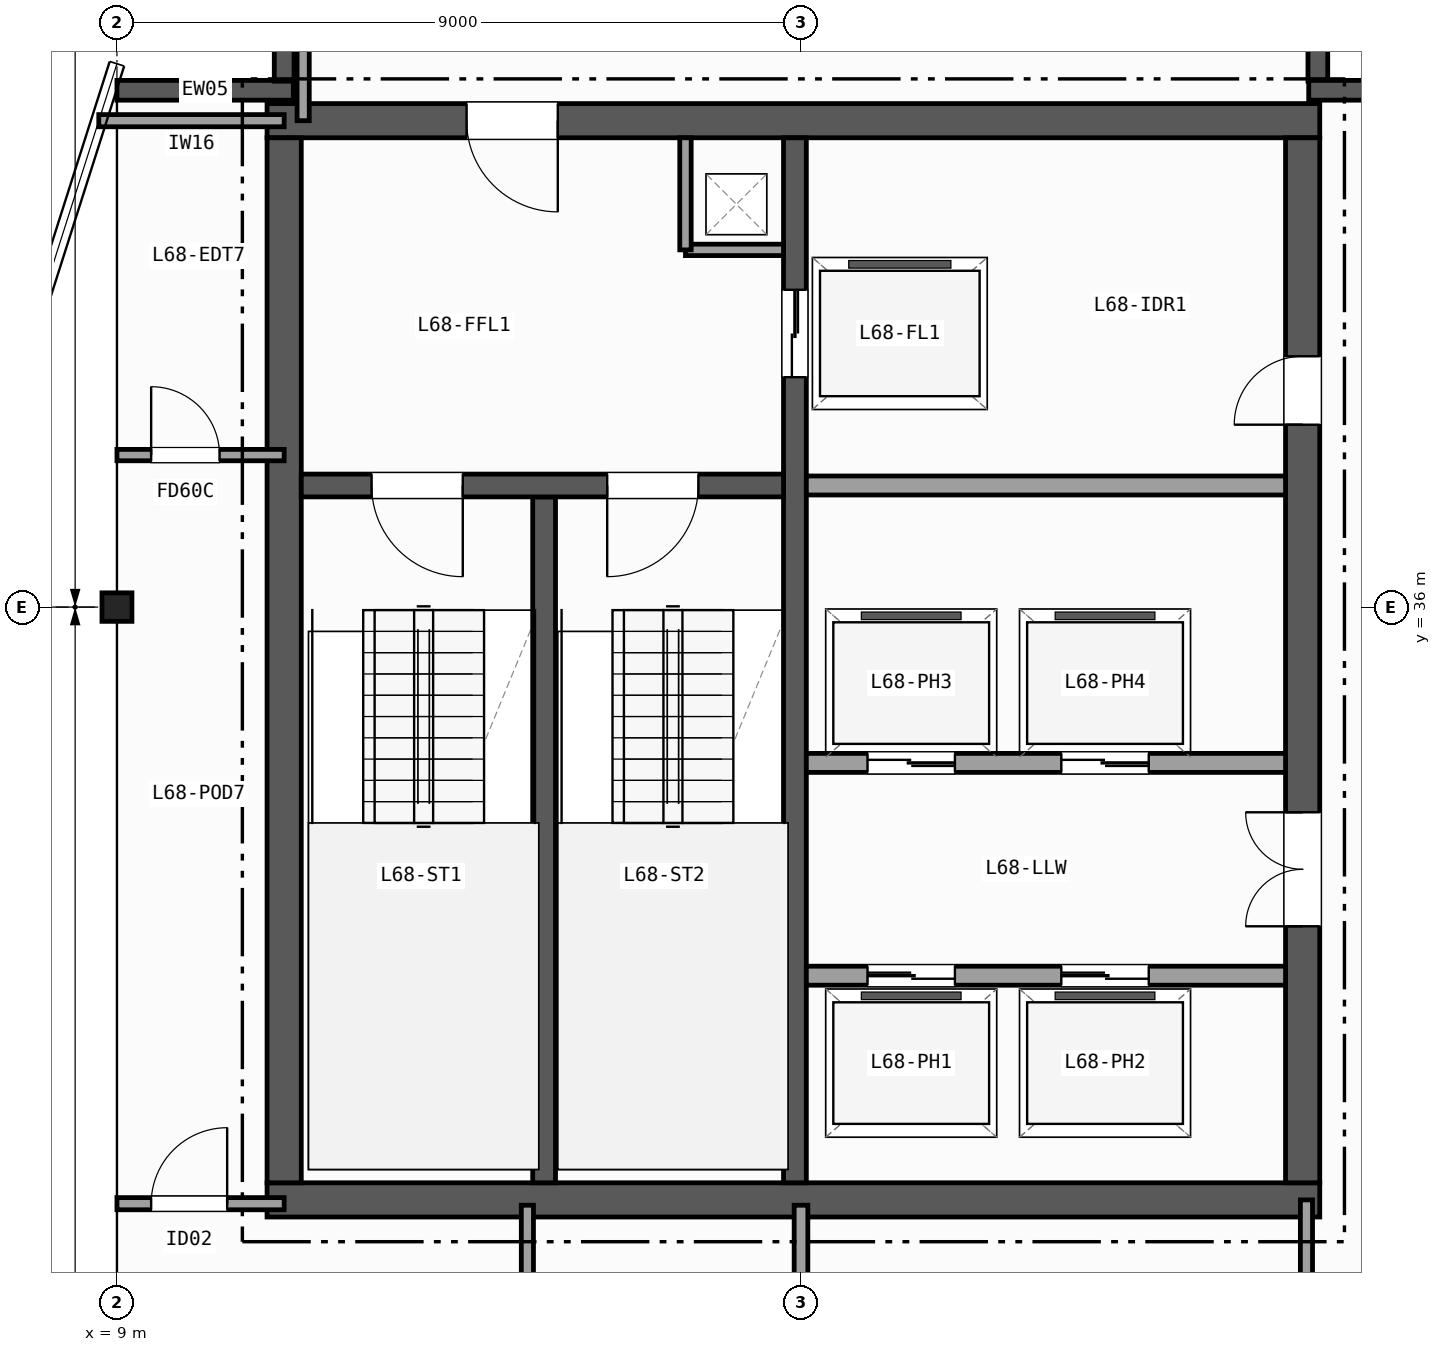
"""IFC4 building model, lengths in metres.
Left out: names, types, materials, properties, quantities, classifications, styles, units other than length and angle.
Written with IfcOpenShell. Run it as: python <this file> out.ifc"""

import sys

from ifc_helpers import new_model, si_unit, direction, frame, frame_2d, origin, origin_2d, place, context, subcontext, project, spatial, rectangle, i_section, extrude, element, fill, save


model = new_model("IFC4")
c1 = context("Model", 3, precision=1e-05, world=origin(), true_north=direction((0.0, 1.0)))
c2 = subcontext(c1, "Body", "Model", "MODEL_VIEW")
j1 = project(units=[si_unit("LENGTHUNIT", "METRE"), si_unit("PLANEANGLEUNIT", "RADIAN")], contexts=[c1])
p1 = place(None, origin())
s1 = spatial("IfcSite", under=j1, at=p1, CompositionType="ELEMENT")
p2 = place(p1, origin())
s2 = spatial("IfcBuilding", under=s1, at=p2, CompositionType="ELEMENT")
p3 = place(p2, frame((0.0, 0.0, 270.4)))
s3 = spatial("IfcBuildingStorey", under=s2, at=p3, CompositionType="ELEMENT", Elevation=270.4)
p4 = place(p3, frame((9.0, 36.0, 0.0), z_axis=(0.0, 0.0, 1.0), x_axis=(1.0, 0.0, 0.0)))
e1 = element("IfcColumn", 1, at=p4, inside=s3, PredefinedType="COLUMN", context=c2, shape_type="SweptSolid", body=[
    extrude(i_section(OverallWidth=0.394, OverallDepth=0.375, WebThickness=0.017, FlangeThickness=0.028, FilletRadius=0.015, at=origin_2d()), origin(), (0.0, 0.0, 1.0), 3.7),
])
p5 = place(p3, frame((9.0, 42.8, 0.0), z_axis=(0.0, 0.0, 1.0), x_axis=(1.0, 0.0, 0.0)))
e2 = element("IfcWall", 2, at=p5, inside=s3, PredefinedType="SOLIDWALL", context=c2, shape_type="SweptSolid", body=[
    extrude(rectangle(XDim=2.32, YDim=0.26, at=frame_2d((1.16, 0.0))), origin(), (0.0, 0.0, 1.0), 3.42),
])
for number, where, z_axis, x_axis in (
    (3, (11.2, 42.92, 0.0), (0.0, 0.0, 1.0), (0.0, 1.0, 0.0)),
    (4, (24.8, 45.0, 0.0), (0.0, 0.0, 1.0), (0.0, -1.0, 0.0)),
):
    element("IfcWall", number, at=place(p3, frame(where, z_axis=z_axis, x_axis=x_axis)), inside=s3, PredefinedType="SOLIDWALL", context=c2, shape_type="SweptSolid", body=[
        extrude(rectangle(XDim=2.08, YDim=0.26, at=frame_2d((1.04, 0.0))), origin(), (0.0, 0.0, 1.0), 3.42),
    ])
p6 = place(p3, frame((24.68, 42.8, 0.0), z_axis=(0.0, 0.0, 1.0), x_axis=(1.0, 0.0, 0.0)))
e5 = element("IfcWall", 5, at=p6, inside=s3, PredefinedType="SOLIDWALL", context=c2, shape_type="SweptSolid", body=[
    extrude(rectangle(XDim=2.32, YDim=0.26, at=frame_2d((1.16, 0.0))), origin(), (0.0, 0.0, 1.0), 3.42),
])
p7 = place(p3, frame((10.975, 28.2, 0.0), z_axis=(0.0, 0.0, 1.0), x_axis=(1.0, 0.0, 0.0)))
e6 = element("IfcWall", 6, at=p7, inside=s3, PredefinedType="SHEAR", context=c2, shape_type="SweptSolid", body=[
    extrude(rectangle(XDim=13.85, YDim=0.45, at=frame_2d((6.925, 0.0))), origin(), (0.0, 0.0, 1.0), 3.42),
])
p8 = place(p3, frame((24.825, 42.4, 0.0), z_axis=(0.0, 0.0, 1.0), x_axis=(-1.0, 0.0, 0.0)))
e7 = element("IfcWall", 7, at=p8, inside=s3, PredefinedType="SHEAR", context=c2, shape_type="SweptSolid", body=[
    extrude(rectangle(XDim=13.85, YDim=0.45, at=frame_2d((6.925, 0.0))), origin(), (0.0, 0.0, 1.0), 3.42),
])
p9 = place(p8, frame((10.025, 0.0, 0.0)))
e8 = element("IfcOpeningElement", 8, at=p9, cuts=e7, PredefinedType="OPENING", context=c2, shape_type="SweptSolid", body=[
    extrude(rectangle(XDim=1.2, YDim=2.15, at=frame_2d((0.6, 1.075))), frame((0.0, 0.235, 0.0), z_axis=(0.0, -1.0, 0.0), x_axis=(1.0, 0.0, 0.0)), (0.0, 0.0, 1.0), 0.47),
])
p10 = place(p3, frame((11.2, 42.175, 0.0), z_axis=(0.0, 0.0, 1.0), x_axis=(0.0, -1.0, 0.0)))
e9 = element("IfcWall", 9, at=p10, inside=s3, PredefinedType="SHEAR", context=c2, shape_type="SweptSolid", body=[
    extrude(rectangle(XDim=13.75, YDim=0.45, at=frame_2d((6.875, 0.0))), origin(), (0.0, 0.0, 1.0), 3.42),
])
p11 = place(p3, frame((24.6, 28.425, 0.0), z_axis=(0.0, 0.0, 1.0), x_axis=(0.0, 1.0, 0.0)))
e10 = element("IfcWall", 10, at=p11, inside=s3, PredefinedType="SHEAR", context=c2, shape_type="SweptSolid", body=[
    extrude(rectangle(XDim=13.75, YDim=0.45, at=frame_2d((6.875, 0.0))), origin(), (0.0, 0.0, 1.0), 3.42),
])
p12 = place(p11, frame((3.375, 0.0, 0.0)))
e11 = element("IfcOpeningElement", 11, at=p12, cuts=e10, PredefinedType="OPENING", context=c2, shape_type="SweptSolid", body=[
    extrude(rectangle(XDim=1.5, YDim=2.2, at=frame_2d((0.75, 1.1))), frame((0.0, 0.235, 0.0), z_axis=(0.0, -1.0, 0.0), x_axis=(1.0, 0.0, 0.0)), (0.0, 0.0, 1.0), 0.47),
])
p13 = place(p11, frame((9.975, 0.0, 0.0)))
e12 = element("IfcOpeningElement", 12, at=p13, cuts=e10, PredefinedType="OPENING", context=c2, shape_type="SweptSolid", body=[
    extrude(rectangle(XDim=0.9, YDim=2.1, at=frame_2d((0.45, 1.05))), frame((0.0, 0.235, 0.0), z_axis=(0.0, -1.0, 0.0), x_axis=(1.0, 0.0, 0.0)), (0.0, 0.0, 1.0), 0.47),
])
p14 = place(p3, frame((14.62, 28.425, 0.0), z_axis=(0.0, 0.0, 1.0), x_axis=(0.0, 1.0, 0.0)))
e13 = element("IfcWall", 13, at=p14, inside=s3, PredefinedType="SHEAR", context=c2, shape_type="SweptSolid", body=[
    extrude(rectangle(XDim=9.025, YDim=0.3, at=frame_2d((4.512, 0.0))), origin(), (0.0, 0.0, 1.0), 3.42),
])
p15 = place(p3, frame((17.92, 42.175, 0.0), z_axis=(0.0, 0.0, 1.0), x_axis=(0.0, -1.0, 0.0)))
e14 = element("IfcWall", 14, at=p15, inside=s3, PredefinedType="SHEAR", context=c2, shape_type="SweptSolid", body=[
    extrude(rectangle(XDim=13.75, YDim=0.3, at=frame_2d((6.875, 0.0))), origin(), (0.0, 0.0, 1.0), 3.42),
])
p16 = place(p15, frame((2.0, 0.0, 0.0)))
e15 = element("IfcOpeningElement", 15, at=p16, cuts=e14, PredefinedType="OPENING", context=c2, shape_type="SweptSolid", body=[
    extrude(rectangle(XDim=1.15, YDim=2.15, at=frame_2d((0.575, 1.075))), frame((0.0, 0.16, 0.0), z_axis=(0.0, -1.0, 0.0), x_axis=(1.0, 0.0, 0.0)), (0.0, 0.0, 1.0), 0.32),
])
p17 = place(p3, frame((17.77, 37.6, 0.0), z_axis=(0.0, 0.0, 1.0), x_axis=(-1.0, 0.0, 0.0)))
e16 = element("IfcWall", 16, at=p17, inside=s3, PredefinedType="SHEAR", context=c2, shape_type="SweptSolid", body=[
    extrude(rectangle(XDim=6.345, YDim=0.3, at=frame_2d((3.172, 0.0))), origin(), (0.0, 0.0, 1.0), 3.42),
])
p18 = place(p17, frame((4.22, 0.0, 0.0)))
e17 = element("IfcOpeningElement", 17, at=p18, cuts=e16, PredefinedType="OPENING", context=c2, shape_type="SweptSolid", body=[
    extrude(rectangle(XDim=1.2, YDim=2.15, at=frame_2d((0.6, 1.075))), frame((0.0, 0.16, 0.0), z_axis=(0.0, -1.0, 0.0), x_axis=(1.0, 0.0, 0.0)), (0.0, 0.0, 1.0), 0.32),
])
p19 = place(p17, frame((1.12, 0.0, 0.0)))
e18 = element("IfcOpeningElement", 18, at=p19, cuts=e16, PredefinedType="OPENING", context=c2, shape_type="SweptSolid", body=[
    extrude(rectangle(XDim=1.2, YDim=2.15, at=frame_2d((0.6, 1.075))), frame((0.0, 0.16, 0.0), z_axis=(0.0, -1.0, 0.0), x_axis=(1.0, 0.0, 0.0)), (0.0, 0.0, 1.0), 0.32),
])
p20 = place(p3, frame((16.48, 40.7, 0.0), z_axis=(0.0, 0.0, 1.0), x_axis=(1.0, 0.0, 0.0)))
e19 = element("IfcWall", 19, at=p20, inside=s3, PredefinedType="PARTITIONING", context=c2, shape_type="SweptSolid", body=[
    extrude(rectangle(XDim=1.29, YDim=0.15, at=frame_2d((0.645, 0.0))), origin(), (0.0, 0.0, 1.0), 3.42),
])
p21 = place(p3, frame((16.48, 40.7, 0.0), z_axis=(0.0, 0.0, 1.0), x_axis=(0.0, 1.0, 0.0)))
e20 = element("IfcWall", 20, at=p21, inside=s3, PredefinedType="PARTITIONING", context=c2, shape_type="SweptSolid", body=[
    extrude(rectangle(XDim=1.475, YDim=0.15, at=frame_2d((0.738, 0.0))), origin(), (0.0, 0.0, 1.0), 3.42),
])
p22 = place(p3, frame((18.07, 37.6, 0.0), z_axis=(0.0, 0.0, 1.0), x_axis=(1.0, 0.0, 0.0)))
e21 = element("IfcWall", 21, at=p22, inside=s3, PredefinedType="PARTITIONING", context=c2, shape_type="SweptSolid", body=[
    extrude(rectangle(XDim=6.305, YDim=0.25, at=frame_2d((3.152, 0.0))), origin(), (0.0, 0.0, 1.0), 3.42),
])
p23 = place(p3, frame((18.07, 31.15, 0.0), z_axis=(0.0, 0.0, 1.0), x_axis=(1.0, 0.0, 0.0)))
e22 = element("IfcWall", 22, at=p23, inside=s3, PredefinedType="PARTITIONING", context=c2, shape_type="SweptSolid", body=[
    extrude(rectangle(XDim=6.305, YDim=0.25, at=frame_2d((3.152, 0.0))), origin(), (0.0, 0.0, 1.0), 3.42),
])
p24 = place(p23, frame((0.805, 0.0, 0.0)))
e23 = element("IfcOpeningElement", 23, at=p24, cuts=e22, PredefinedType="OPENING", context=c2, shape_type="SweptSolid", body=[
    extrude(rectangle(XDim=1.15, YDim=2.15, at=frame_2d((0.575, 1.075))), frame((0.0, 0.135, 0.0), z_axis=(0.0, -1.0, 0.0), x_axis=(1.0, 0.0, 0.0)), (0.0, 0.0, 1.0), 0.27),
])
p25 = place(p23, frame((3.355, 0.0, 0.0)))
e24 = element("IfcOpeningElement", 24, at=p25, cuts=e22, PredefinedType="OPENING", context=c2, shape_type="SweptSolid", body=[
    extrude(rectangle(XDim=1.15, YDim=2.15, at=frame_2d((0.575, 1.075))), frame((0.0, 0.135, 0.0), z_axis=(0.0, -1.0, 0.0), x_axis=(1.0, 0.0, 0.0)), (0.0, 0.0, 1.0), 0.27),
])
p26 = place(p3, frame((24.375, 33.95, 0.0), z_axis=(0.0, 0.0, 1.0), x_axis=(-1.0, 0.0, 0.0)))
e25 = element("IfcWall", 25, at=p26, inside=s3, PredefinedType="PARTITIONING", context=c2, shape_type="SweptSolid", body=[
    extrude(rectangle(XDim=6.305, YDim=0.25, at=frame_2d((3.152, 0.0))), origin(), (0.0, 0.0, 1.0), 3.42),
])
p27 = place(p26, frame((4.35, 0.0, 0.0)))
e26 = element("IfcOpeningElement", 26, at=p27, cuts=e25, PredefinedType="OPENING", context=c2, shape_type="SweptSolid", body=[
    extrude(rectangle(XDim=1.15, YDim=2.15, at=frame_2d((0.575, 1.075))), frame((0.0, 0.135, 0.0), z_axis=(0.0, -1.0, 0.0), x_axis=(1.0, 0.0, 0.0)), (0.0, 0.0, 1.0), 0.27),
])
p28 = place(p26, frame((1.8, 0.0, 0.0)))
e27 = element("IfcOpeningElement", 27, at=p28, cuts=e25, PredefinedType="OPENING", context=c2, shape_type="SweptSolid", body=[
    extrude(rectangle(XDim=1.15, YDim=2.15, at=frame_2d((0.575, 1.075))), frame((0.0, 0.135, 0.0), z_axis=(0.0, -1.0, 0.0), x_axis=(1.0, 0.0, 0.0)), (0.0, 0.0, 1.0), 0.27),
])
p29 = place(p3, frame((9.0, 28.15, 0.0), z_axis=(0.0, 0.0, 1.0), x_axis=(1.0, 0.0, 0.0)))
e28 = element("IfcWall", 28, at=p29, inside=s3, PredefinedType="PARTITIONING", context=c2, shape_type="SweptSolid", body=[
    extrude(rectangle(XDim=2.2, YDim=0.16, at=frame_2d((1.1, 0.0))), origin(), (0.0, 0.0, 1.0), 2.707),
])
p30 = place(p29, frame((0.45, 0.0, 0.0)))
e29 = element("IfcOpeningElement", 29, at=p30, cuts=e28, PredefinedType="OPENING", context=c2, shape_type="SweptSolid", body=[
    extrude(rectangle(XDim=1.0, YDim=2.1, at=frame_2d((0.5, 1.05))), frame((0.0, 0.09, 0.0), z_axis=(0.0, -1.0, 0.0), x_axis=(1.0, 0.0, 0.0)), (0.0, 0.0, 1.0), 0.18),
])
p31 = place(p3, frame((8.761, 42.4, 0.0), z_axis=(0.0, 0.0, 1.0), x_axis=(1.0, 0.0, 0.0)))
e30 = element("IfcWall", 30, at=p31, inside=s3, PredefinedType="PARTITIONING", context=c2, shape_type="SweptSolid", body=[
    extrude(rectangle(XDim=2.439, YDim=0.16, at=frame_2d((1.219, 0.0))), origin(), (0.0, 0.0, 1.0), 3.42),
])
p32 = place(p3, frame((11.45, 42.4, 0.0), z_axis=(0.0, 0.0, 1.0), x_axis=(0.0, 1.0, 0.0)))
e31 = element("IfcWall", 31, at=p32, inside=s3, PredefinedType="PARTITIONING", context=c2, shape_type="SweptSolid", body=[
    extrude(rectangle(XDim=2.666, YDim=0.16, at=frame_2d((1.333, 0.0))), origin(), (0.0, 0.0, 1.0), 3.42),
])
p33 = place(p3, frame((9.0, 38.0, 0.0), z_axis=(0.0, 0.0, 1.0), x_axis=(1.0, 0.0, 0.0)))
e32 = element("IfcWall", 32, at=p33, inside=s3, PredefinedType="PARTITIONING", context=c2, shape_type="SweptSolid", body=[
    extrude(rectangle(XDim=2.2, YDim=0.15, at=frame_2d((1.1, 0.0))), origin(), (0.0, 0.0, 1.0), 3.42),
])
p34 = place(p33, frame((0.45, 0.0, 0.0)))
e33 = element("IfcOpeningElement", 33, at=p34, cuts=e32, PredefinedType="OPENING", context=c2, shape_type="SweptSolid", body=[
    extrude(rectangle(XDim=0.9, YDim=2.1, at=frame_2d((0.45, 1.05))), frame((0.0, 0.085, 0.0), z_axis=(0.0, -1.0, 0.0), x_axis=(1.0, 0.0, 0.0)), (0.0, 0.0, 1.0), 0.17),
])
p35 = place(p3, frame((24.65, 9.0, 0.0), z_axis=(0.0, 0.0, 1.0), x_axis=(0.0, 1.0, 0.0)))
e34 = element("IfcWall", 34, at=p35, inside=s3, PredefinedType="PARTITIONING", context=c2, shape_type="SweptSolid", body=[
    extrude(rectangle(XDim=19.2, YDim=0.16, at=frame_2d((9.6, 0.0))), origin(), (0.0, 0.0, 1.0), 2.707),
])
p36 = place(p35, frame((10.2, 0.0, 0.0)))
e35 = element("IfcOpeningElement", 35, at=p36, cuts=e34, PredefinedType="OPENING", context=c2, shape_type="SweptSolid", body=[
    extrude(rectangle(XDim=1.2, YDim=2.15, at=frame_2d((0.6, 1.075))), frame((0.0, 0.09, 0.0), z_axis=(0.0, -1.0, 0.0), x_axis=(1.0, 0.0, 0.0)), (0.0, 0.0, 1.0), 0.18),
])
p37 = place(p35, frame((2.55, 0.0, 0.0)))
e36 = element("IfcOpeningElement", 36, at=p37, cuts=e34, PredefinedType="OPENING", context=c2, shape_type="SweptSolid", body=[
    extrude(rectangle(XDim=0.86, YDim=2.05, at=frame_2d((0.43, 1.025))), frame((0.0, 0.09, 0.0), z_axis=(0.0, -1.0, 0.0), x_axis=(1.0, 0.0, 0.0)), (0.0, 0.0, 1.0), 0.18),
])
p38 = place(p3, frame((18.0, 17.4, 0.0), z_axis=(0.0, 0.0, 1.0), x_axis=(0.0, 1.0, 0.0)))
e37 = element("IfcWall", 37, at=p38, inside=s3, PredefinedType="PARTITIONING", context=c2, shape_type="SweptSolid", body=[
    extrude(rectangle(XDim=10.73, YDim=0.18, at=frame_2d((5.365, 0.0))), origin(), (0.0, 0.0, 1.0), 2.789),
])
p39 = place(p38, frame((4.1, 0.0, 0.0)))
e38 = element("IfcOpeningElement", 38, at=p39, cuts=e37, PredefinedType="OPENING", context=c2, shape_type="SweptSolid", body=[
    extrude(rectangle(XDim=0.95, YDim=2.1, at=frame_2d((0.475, 1.05))), frame((0.0, 0.1, 0.0), z_axis=(0.0, -1.0, 0.0), x_axis=(1.0, 0.0, 0.0)), (0.0, 0.0, 1.0), 0.2),
])
p40 = place(p3, frame((14.4, 18.0, 0.0), z_axis=(0.0, 0.0, 1.0), x_axis=(0.0, 1.0, 0.0)))
e39 = element("IfcWall", 39, at=p40, inside=s3, PredefinedType="PARTITIONING", context=c2, shape_type="SweptSolid", body=[
    extrude(rectangle(XDim=10.13, YDim=0.16, at=frame_2d((5.065, 0.0))), origin(), (0.0, 0.0, 1.0), 2.789),
])
p41 = place(p40, frame((2.5, 0.0, 0.0)))
e40 = element("IfcOpeningElement", 40, at=p41, cuts=e39, PredefinedType="OPENING", context=c2, shape_type="SweptSolid", body=[
    extrude(rectangle(XDim=1.0, YDim=2.1, at=frame_2d((0.5, 1.05))), frame((0.0, 0.09, 0.0), z_axis=(0.0, -1.0, 0.0), x_axis=(1.0, 0.0, 0.0)), (0.0, 0.0, 1.0), 0.18),
])
p42 = place(p18, origin())
e41 = element("IfcDoor", 41, at=p42, inside=s3, OperationType="SINGLE_SWING_LEFT", PredefinedType="DOOR", context=c2, shape_type="SweptSolid", body=[
    extrude(rectangle(XDim=1.2, YDim=2.15, at=frame_2d((0.6, 1.075))), frame((0.0, 0.025, 0.0), z_axis=(0.0, -1.0, 0.0), x_axis=(1.0, 0.0, 0.0)), (0.0, 0.0, 1.0), 0.05),
])
fill(e17, e41)
p43 = place(p19, origin())
e42 = element("IfcDoor", 42, at=p43, inside=s3, OperationType="SINGLE_SWING_RIGHT", PredefinedType="DOOR", context=c2, shape_type="SweptSolid", body=[
    extrude(rectangle(XDim=1.2, YDim=2.15, at=frame_2d((0.6, 1.075))), frame((0.0, 0.025, 0.0), z_axis=(0.0, -1.0, 0.0), x_axis=(1.0, 0.0, 0.0)), (0.0, 0.0, 1.0), 0.05),
])
fill(e18, e42)
p44 = place(p12, origin())
e43 = element("IfcDoor", 43, at=p44, inside=s3, OperationType="DOUBLE_DOOR_SINGLE_SWING", PredefinedType="DOOR", context=c2, shape_type="SweptSolid", body=[
    extrude(rectangle(XDim=1.5, YDim=2.2, at=frame_2d((0.75, 1.1))), frame((0.0, 0.025, 0.0), z_axis=(0.0, -1.0, 0.0), x_axis=(1.0, 0.0, 0.0)), (0.0, 0.0, 1.0), 0.05),
])
fill(e11, e43)
p45 = place(p9, origin())
e44 = element("IfcDoor", 44, at=p45, inside=s3, OperationType="SINGLE_SWING_LEFT", PredefinedType="DOOR", context=c2, shape_type="SweptSolid", body=[
    extrude(rectangle(XDim=1.2, YDim=2.15, at=frame_2d((0.6, 1.075))), frame((0.0, 0.025, 0.0), z_axis=(0.0, -1.0, 0.0), x_axis=(1.0, 0.0, 0.0)), (0.0, 0.0, 1.0), 0.05),
])
fill(e8, e44)
p46 = place(p13, origin())
e45 = element("IfcDoor", 45, at=p46, inside=s3, OperationType="SINGLE_SWING_LEFT", PredefinedType="DOOR", context=c2, shape_type="SweptSolid", body=[
    extrude(rectangle(XDim=0.9, YDim=2.1, at=frame_2d((0.45, 1.05))), frame((0.0, 0.025, 0.0), z_axis=(0.0, -1.0, 0.0), x_axis=(1.0, 0.0, 0.0)), (0.0, 0.0, 1.0), 0.05),
])
fill(e12, e45)
p47 = place(p16, origin())
e46 = element("IfcDoor", 46, at=p47, inside=s3, OperationType="DOUBLE_DOOR_SLIDING", PredefinedType="DOOR", context=c2, shape_type="SweptSolid", body=[
    extrude(rectangle(XDim=1.15, YDim=2.15, at=frame_2d((0.575, 1.075))), frame((0.0, 0.025, 0.0), z_axis=(0.0, -1.0, 0.0), x_axis=(1.0, 0.0, 0.0)), (0.0, 0.0, 1.0), 0.05),
])
fill(e15, e46)
p48 = place(p24, origin())
e47 = element("IfcDoor", 47, at=p48, inside=s3, OperationType="DOUBLE_DOOR_SLIDING", PredefinedType="DOOR", context=c2, shape_type="SweptSolid", body=[
    extrude(rectangle(XDim=1.15, YDim=2.15, at=frame_2d((0.575, 1.075))), frame((0.0, 0.025, 0.0), z_axis=(0.0, -1.0, 0.0), x_axis=(1.0, 0.0, 0.0)), (0.0, 0.0, 1.0), 0.05),
])
fill(e23, e47)
p49 = place(p25, origin())
e48 = element("IfcDoor", 48, at=p49, inside=s3, OperationType="DOUBLE_DOOR_SLIDING", PredefinedType="DOOR", context=c2, shape_type="SweptSolid", body=[
    extrude(rectangle(XDim=1.15, YDim=2.15, at=frame_2d((0.575, 1.075))), frame((0.0, 0.025, 0.0), z_axis=(0.0, -1.0, 0.0), x_axis=(1.0, 0.0, 0.0)), (0.0, 0.0, 1.0), 0.05),
])
fill(e24, e48)
p50 = place(p27, origin())
e49 = element("IfcDoor", 49, at=p50, inside=s3, OperationType="DOUBLE_DOOR_SLIDING", PredefinedType="DOOR", context=c2, shape_type="SweptSolid", body=[
    extrude(rectangle(XDim=1.15, YDim=2.15, at=frame_2d((0.575, 1.075))), frame((0.0, 0.025, 0.0), z_axis=(0.0, -1.0, 0.0), x_axis=(1.0, 0.0, 0.0)), (0.0, 0.0, 1.0), 0.05),
])
fill(e26, e49)
p51 = place(p28, origin())
e50 = element("IfcDoor", 50, at=p51, inside=s3, OperationType="DOUBLE_DOOR_SLIDING", PredefinedType="DOOR", context=c2, shape_type="SweptSolid", body=[
    extrude(rectangle(XDim=1.15, YDim=2.15, at=frame_2d((0.575, 1.075))), frame((0.0, 0.025, 0.0), z_axis=(0.0, -1.0, 0.0), x_axis=(1.0, 0.0, 0.0)), (0.0, 0.0, 1.0), 0.05),
])
fill(e27, e50)
p52 = place(p30, origin())
e51 = element("IfcDoor", 51, at=p52, inside=s3, OperationType="SINGLE_SWING_RIGHT", PredefinedType="DOOR", context=c2, shape_type="SweptSolid", body=[
    extrude(rectangle(XDim=1.0, YDim=2.1, at=frame_2d((0.5, 1.05))), frame((0.0, 0.025, 0.0), z_axis=(0.0, -1.0, 0.0), x_axis=(1.0, 0.0, 0.0)), (0.0, 0.0, 1.0), 0.05),
])
fill(e29, e51)
p53 = place(p34, origin())
e52 = element("IfcDoor", 52, at=p53, inside=s3, OperationType="SINGLE_SWING_LEFT", PredefinedType="DOOR", context=c2, shape_type="SweptSolid", body=[
    extrude(rectangle(XDim=0.9, YDim=2.1, at=frame_2d((0.45, 1.05))), frame((0.0, 0.025, 0.0), z_axis=(0.0, -1.0, 0.0), x_axis=(1.0, 0.0, 0.0)), (0.0, 0.0, 1.0), 0.05),
])
fill(e33, e52)
save(model, sys.argv[1])
